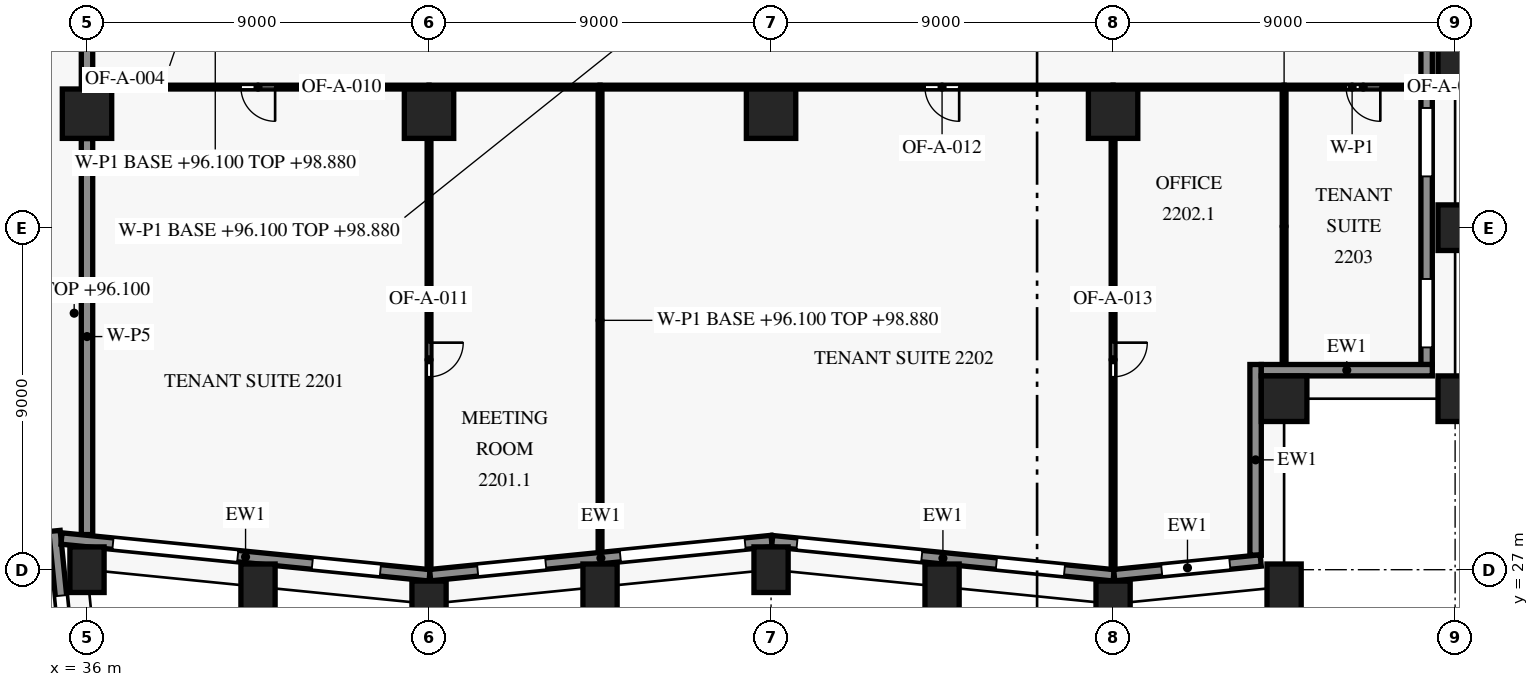
"""IFC4 building model, lengths in metres.
Left out: names, types, materials, properties, quantities, classifications, styles, units other than length and angle.
Written with IfcOpenShell. Run it as: python <this file> out.ifc"""

import sys

from ifc_helpers import new_model, si_unit, direction, frame, frame_2d, origin, origin_2d, place, context, subcontext, project, spatial, rectangle, extrude, element, fill, save


model = new_model("IFC4")
c1 = context("Model", 3, precision=1e-05, world=origin(), true_north=direction((0.0, 1.0)))
c2 = subcontext(c1, "Body", "Model", "MODEL_VIEW")
j1 = project(units=[si_unit("LENGTHUNIT", "METRE"), si_unit("PLANEANGLEUNIT", "RADIAN")], contexts=[c1])
p1 = place(None, origin())
s1 = spatial("IfcSite", under=j1, at=p1, CompositionType="ELEMENT")
p2 = place(p1, origin())
s2 = spatial("IfcBuilding", under=s1, at=p2, CompositionType="ELEMENT")
p3 = place(p2, frame((0.0, 0.0, 96.1)))
s3 = spatial("IfcBuildingStorey", under=s2, at=p3, CompositionType="ELEMENT", Elevation=96.1)
for number, where, z_axis, x_axis in (
    (1, (36.0, 27.0, 0.0), (0.0, 0.0, 1.0), (-0.1, 0.995, 0.0)),
    (2, (40.5, 26.55, 0.0), (0.0, 0.0, 1.0), (0.995, -0.1, 0.0)),
    (3, (45.0, 26.1, 0.0), (0.0, 0.0, 1.0), (1.0, 0.0, 0.0)),
    (4, (49.5, 26.55, 0.0), (0.0, 0.0, 1.0), (0.995, 0.1, 0.0)),
    (5, (54.0, 27.0, 0.0), (0.0, 0.0, 1.0), (1.0, 0.0, 0.0)),
    (6, (58.5, 26.55, 0.0), (0.0, 0.0, 1.0), (0.995, -0.1, 0.0)),
    (7, (63.0, 26.1, 0.0), (0.0, 0.0, 1.0), (1.0, 0.0, 0.0)),
    (8, (67.5, 26.55, 0.0), (0.0, 0.0, 1.0), (0.995, 0.1, 0.0)),
    (9, (72.0, 31.5, 0.0), (0.0, 0.0, 1.0), (0.0, 1.0, 0.0)),
    (10, (72.0, 36.0, 0.0), (0.0, 0.0, 1.0), (0.0, 1.0, 0.0)),
    (11, (72.0, 40.5, 0.0), (0.0, 0.0, 1.0), (0.0, 1.0, 0.0)),
):
    element("IfcColumn", number, at=place(p3, frame(where, z_axis=z_axis, x_axis=x_axis)), inside=s3, PredefinedType="COLUMN", context=c2, shape_type="SweptSolid", body=[
        extrude(rectangle(XDim=0.9, YDim=1.2, at=origin_2d()), origin(), (0.0, 0.0, 1.0), 3.8),
    ])
p4 = place(p3, frame((67.5, 31.5, 0.0), z_axis=(0.0, 0.0, 1.0), x_axis=(1.0, 0.0, 0.0)))
e12 = element("IfcColumn", 12, at=p4, inside=s3, PredefinedType="COLUMN", context=c2, shape_type="SweptSolid", body=[
    extrude(rectangle(XDim=1.2, YDim=1.2, at=origin_2d()), origin(), (0.0, 0.0, 1.0), 3.8),
])
for number, where, z_axis, x_axis in (
    (13, (36.0, 39.0, 0.0), (0.0, 0.0, 1.0), (1.0, 0.0, 0.0)),
    (14, (45.0, 39.0, 0.0), (0.0, 0.0, 1.0), (1.0, 0.0, 0.0)),
    (15, (54.0, 39.0, 0.0), (0.0, 0.0, 1.0), (1.0, 0.0, 0.0)),
    (16, (63.0, 39.0, 0.0), (0.0, 0.0, 1.0), (1.0, 0.0, 0.0)),
):
    element("IfcColumn", number, at=place(p3, frame(where, z_axis=z_axis, x_axis=x_axis)), inside=s3, PredefinedType="COLUMN", context=c2, shape_type="SweptSolid", body=[
        extrude(rectangle(XDim=1.3, YDim=1.3, at=origin_2d()), origin(), (0.0, 0.0, 1.0), 3.8),
    ])
p5 = place(p3, frame((35.144, 28.02, 0.0), z_axis=(0.0, 0.0, 1.0), x_axis=(0.099503719021, -0.99503719021, 0.0)))
e17 = element("IfcWall", 17, at=p5, inside=s3, PredefinedType="SOLIDWALL", context=c2, shape_type="SweptSolid", body=[
    extrude(rectangle(XDim=10.04, YDim=0.3, at=frame_2d((5.02, 0.0))), origin(), (0.0, 0.0, 1.0), 3.15),
])
p6 = place(p5, frame((1.711, 0.0, 0.15)))
e18 = element("IfcOpeningElement", 18, at=p6, cuts=e17, PredefinedType="OPENING", context=c2, shape_type="SweptSolid", body=[
    extrude(rectangle(XDim=3.3, YDim=2.4, at=frame_2d((1.65, 1.2))), frame((0.0, 0.16, 0.0), z_axis=(0.0, -1.0, 0.0), x_axis=(1.0, 0.0, 0.0)), (0.0, 0.0, 1.0), 0.32),
])
p7 = place(p5, frame((6.984, 0.0, 0.75)))
e19 = element("IfcOpeningElement", 19, at=p7, cuts=e17, PredefinedType="OPENING", context=c2, shape_type="SweptSolid", body=[
    extrude(rectangle(XDim=1.8, YDim=1.8, at=frame_2d((0.9, 0.9))), frame((0.0, 0.16, 0.0), z_axis=(0.0, -1.0, 0.0), x_axis=(1.0, 0.0, 0.0)), (0.0, 0.0, 1.0), 0.32),
])
p8 = place(p3, frame((45.015, 26.852, 0.0), z_axis=(0.0, 0.0, 1.0), x_axis=(-0.995037438546, 0.099501235631, 0.0)))
e20 = element("IfcWall", 20, at=p8, inside=s3, PredefinedType="SOLIDWALL", context=c2, shape_type="SweptSolid", body=[
    extrude(rectangle(XDim=9.734, YDim=0.3, at=frame_2d((4.867, 0.0))), origin(), (0.0, 0.0, 1.0), 3.15),
])
p9 = place(p8, frame((1.301, 0.0, 0.75)))
e21 = element("IfcOpeningElement", 21, at=p9, cuts=e20, PredefinedType="OPENING", context=c2, shape_type="SweptSolid", body=[
    extrude(rectangle(XDim=1.8, YDim=1.8, at=frame_2d((0.9, 0.9))), frame((0.0, 0.16, 0.0), z_axis=(0.0, -1.0, 0.0), x_axis=(1.0, 0.0, 0.0)), (0.0, 0.0, 1.0), 0.32),
])
p10 = place(p8, frame((5.073, 0.0, 0.15)))
e22 = element("IfcOpeningElement", 22, at=p10, cuts=e20, PredefinedType="OPENING", context=c2, shape_type="SweptSolid", body=[
    extrude(rectangle(XDim=3.3, YDim=2.4, at=frame_2d((1.65, 1.2))), frame((0.0, 0.16, 0.0), z_axis=(0.0, -1.0, 0.0), x_axis=(1.0, 0.0, 0.0)), (0.0, 0.0, 1.0), 0.32),
])
p11 = place(p3, frame((54.015, 27.755, 0.0), z_axis=(0.0, 0.0, 1.0), x_axis=(-0.995037993253, -0.099495688264, 0.0)))
e23 = element("IfcWall", 23, at=p11, inside=s3, PredefinedType="SOLIDWALL", context=c2, shape_type="SweptSolid", body=[
    extrude(rectangle(XDim=9.03, YDim=0.3, at=frame_2d((4.515, 0.0))), origin(), (0.0, 0.0, 1.0), 3.15),
])
p12 = place(p11, frame((0.701, 0.0, 0.15)))
e24 = element("IfcOpeningElement", 24, at=p12, cuts=e23, PredefinedType="OPENING", context=c2, shape_type="SweptSolid", body=[
    extrude(rectangle(XDim=3.3, YDim=2.4, at=frame_2d((1.65, 1.2))), frame((0.0, 0.16, 0.0), z_axis=(0.0, -1.0, 0.0), x_axis=(1.0, 0.0, 0.0)), (0.0, 0.0, 1.0), 0.32),
])
p13 = place(p11, frame((5.974, 0.0, 0.75)))
e25 = element("IfcOpeningElement", 25, at=p13, cuts=e23, PredefinedType="OPENING", context=c2, shape_type="SweptSolid", body=[
    extrude(rectangle(XDim=1.8, YDim=1.8, at=frame_2d((0.9, 0.9))), frame((0.0, 0.16, 0.0), z_axis=(0.0, -1.0, 0.0), x_axis=(1.0, 0.0, 0.0)), (0.0, 0.0, 1.0), 0.32),
])
p14 = place(p3, frame((63.015, 26.852, 0.0), z_axis=(0.0, 0.0, 1.0), x_axis=(-0.995037993253, 0.099495688264, 0.0)))
e26 = element("IfcWall", 26, at=p14, inside=s3, PredefinedType="SOLIDWALL", context=c2, shape_type="SweptSolid", body=[
    extrude(rectangle(XDim=9.03, YDim=0.3, at=frame_2d((4.515, 0.0))), origin(), (0.0, 0.0, 1.0), 3.15),
])
p15 = place(p14, frame((1.301, 0.0, 0.75)))
e27 = element("IfcOpeningElement", 27, at=p15, cuts=e26, PredefinedType="OPENING", context=c2, shape_type="SweptSolid", body=[
    extrude(rectangle(XDim=1.8, YDim=1.8, at=frame_2d((0.9, 0.9))), frame((0.0, 0.16, 0.0), z_axis=(0.0, -1.0, 0.0), x_axis=(1.0, 0.0, 0.0)), (0.0, 0.0, 1.0), 0.32),
])
p16 = place(p14, frame((5.073, 0.0, 0.15)))
e28 = element("IfcOpeningElement", 28, at=p16, cuts=e26, PredefinedType="OPENING", context=c2, shape_type="SweptSolid", body=[
    extrude(rectangle(XDim=3.3, YDim=2.4, at=frame_2d((1.65, 1.2))), frame((0.0, 0.16, 0.0), z_axis=(0.0, -1.0, 0.0), x_axis=(1.0, 0.0, 0.0)), (0.0, 0.0, 1.0), 0.32),
])
p17 = place(p3, frame((66.885, 27.242, 0.0), z_axis=(0.0, 0.0, 1.0), x_axis=(-0.995037814081, -0.099497480111, 0.0)))
e29 = element("IfcWall", 29, at=p17, inside=s3, PredefinedType="SOLIDWALL", context=c2, shape_type="SweptSolid", body=[
    extrude(rectangle(XDim=3.875, YDim=0.3, at=frame_2d((1.937, 0.0))), origin(), (0.0, 0.0, 1.0), 3.15),
])
p18 = place(p17, frame((0.818, 0.0, 0.75)))
e30 = element("IfcOpeningElement", 30, at=p18, cuts=e29, PredefinedType="OPENING", context=c2, shape_type="SweptSolid", body=[
    extrude(rectangle(XDim=1.8, YDim=1.8, at=frame_2d((0.9, 0.9))), frame((0.0, 0.16, 0.0), z_axis=(0.0, -1.0, 0.0), x_axis=(1.0, 0.0, 0.0)), (0.0, 0.0, 1.0), 0.32),
])
p19 = place(p3, frame((66.75, 32.4, 0.0), z_axis=(0.0, 0.0, 1.0), x_axis=(0.0, -1.0, 0.0)))
e31 = element("IfcWall", 31, at=p19, inside=s3, PredefinedType="SOLIDWALL", context=c2, shape_type="SweptSolid", body=[
    extrude(rectangle(XDim=5.019, YDim=0.3, at=frame_2d((2.51, 0.0))), origin(), (0.0, 0.0, 1.0), 3.15),
])
p20 = place(p3, frame((71.4, 32.25, 0.0), z_axis=(0.0, 0.0, 1.0), x_axis=(-1.0, 0.0, 0.0)))
e32 = element("IfcWall", 32, at=p20, inside=s3, PredefinedType="SOLIDWALL", context=c2, shape_type="SweptSolid", body=[
    extrude(rectangle(XDim=4.5, YDim=0.3, at=frame_2d((2.25, 0.0))), origin(), (0.0, 0.0, 1.0), 3.15),
])
p21 = place(p3, frame((71.25, 57.9, 0.0), z_axis=(0.0, 0.0, 1.0), x_axis=(0.0, -1.0, 0.0)))
e33 = element("IfcWall", 33, at=p21, inside=s3, PredefinedType="SOLIDWALL", context=c2, shape_type="SweptSolid", body=[
    extrude(rectangle(XDim=25.502, YDim=0.3, at=frame_2d((12.751, 0.0))), origin(), (0.0, 0.0, 1.0), 3.15),
])
p22 = place(p21, frame((0.75, 0.0, 0.75)))
e34 = element("IfcOpeningElement", 34, at=p22, cuts=e33, PredefinedType="OPENING", context=c2, shape_type="SweptSolid", body=[
    extrude(rectangle(XDim=1.8, YDim=1.8, at=frame_2d((0.9, 0.9))), frame((0.0, 0.16, 0.0), z_axis=(0.0, -1.0, 0.0), x_axis=(1.0, 0.0, 0.0)), (0.0, 0.0, 1.0), 0.32),
])
p23 = place(p21, frame((5.25, 0.0, 0.75)))
e35 = element("IfcOpeningElement", 35, at=p23, cuts=e33, PredefinedType="OPENING", context=c2, shape_type="SweptSolid", body=[
    extrude(rectangle(XDim=1.8, YDim=1.8, at=frame_2d((0.9, 0.9))), frame((0.0, 0.16, 0.0), z_axis=(0.0, -1.0, 0.0), x_axis=(1.0, 0.0, 0.0)), (0.0, 0.0, 1.0), 0.32),
])
p24 = place(p21, frame((9.0, 0.0, 0.15)))
e36 = element("IfcOpeningElement", 36, at=p24, cuts=e33, PredefinedType="OPENING", context=c2, shape_type="SweptSolid", body=[
    extrude(rectangle(XDim=3.3, YDim=2.4, at=frame_2d((1.65, 1.2))), frame((0.0, 0.16, 0.0), z_axis=(0.0, -1.0, 0.0), x_axis=(1.0, 0.0, 0.0)), (0.0, 0.0, 1.0), 0.32),
])
p25 = place(p21, frame((13.5, 0.0, 0.15)))
e37 = element("IfcOpeningElement", 37, at=p25, cuts=e33, PredefinedType="OPENING", context=c2, shape_type="SweptSolid", body=[
    extrude(rectangle(XDim=3.3, YDim=2.4, at=frame_2d((1.65, 1.2))), frame((0.0, 0.16, 0.0), z_axis=(0.0, -1.0, 0.0), x_axis=(1.0, 0.0, 0.0)), (0.0, 0.0, 1.0), 0.32),
])
p26 = place(p21, frame((18.75, 0.0, 0.75)))
e38 = element("IfcOpeningElement", 38, at=p26, cuts=e33, PredefinedType="OPENING", context=c2, shape_type="SweptSolid", body=[
    extrude(rectangle(XDim=1.8, YDim=1.8, at=frame_2d((0.9, 0.9))), frame((0.0, 0.16, 0.0), z_axis=(0.0, -1.0, 0.0), x_axis=(1.0, 0.0, 0.0)), (0.0, 0.0, 1.0), 0.32),
])
p27 = place(p21, frame((23.25, 0.0, 0.75)))
e39 = element("IfcOpeningElement", 39, at=p27, cuts=e33, PredefinedType="OPENING", context=c2, shape_type="SweptSolid", body=[
    extrude(rectangle(XDim=1.8, YDim=1.8, at=frame_2d((0.9, 0.9))), frame((0.0, 0.16, 0.0), z_axis=(0.0, -1.0, 0.0), x_axis=(1.0, 0.0, 0.0)), (0.0, 0.0, 1.0), 0.32),
])
for number, where, z_axis, x_axis in (
    (40, (24.655, 27.0, 0.0), (0.0, 0.0, 1.0), (1.0, 0.0, 0.0)),
    (41, (36.0, 27.925, 0.0), (0.0, 0.0, 1.0), (0.0, 1.0, 0.0)),
):
    element("IfcWall", number, at=place(p3, frame(where, z_axis=z_axis, x_axis=x_axis)), inside=s3, PredefinedType="PARTITIONING", context=c2, shape_type="SweptSolid", body=[
        extrude(rectangle(XDim=10.42, YDim=0.3, at=frame_2d((5.21, 0.0))), origin(), (0.0, 0.0, 1.0), 2.78),
    ])
p28 = place(p3, frame((45.0, 38.345, 0.0), z_axis=(0.0, 0.0, 1.0), x_axis=(0.0, -1.0, 0.0)))
e42 = element("IfcWall", 42, at=p28, inside=s3, PredefinedType="PARTITIONING", context=c2, shape_type="SweptSolid", body=[
    extrude(rectangle(XDim=11.321, YDim=0.1, at=frame_2d((5.66, 0.0))), origin(), (0.0, 0.0, 1.0), 2.88),
])
p29 = place(p28, frame((5.37, 0.0, 0.0)))
e43 = element("IfcOpeningElement", 43, at=p29, cuts=e42, PredefinedType="OPENING", context=c2, shape_type="SweptSolid", body=[
    extrude(rectangle(XDim=0.9, YDim=2.1, at=frame_2d((0.45, 1.05))), frame((0.0, 0.06, 0.0), z_axis=(0.0, -1.0, 0.0), x_axis=(1.0, 0.0, 0.0)), (0.0, 0.0, 1.0), 0.12),
])
p30 = place(p3, frame((63.0, 38.345, 0.0), z_axis=(0.0, 0.0, 1.0), x_axis=(0.0, -1.0, 0.0)))
e44 = element("IfcWall", 44, at=p30, inside=s3, PredefinedType="PARTITIONING", context=c2, shape_type="SweptSolid", body=[
    extrude(rectangle(XDim=11.321, YDim=0.1, at=frame_2d((5.66, 0.0))), origin(), (0.0, 0.0, 1.0), 2.88),
])
p31 = place(p30, frame((5.37, 0.0, 0.0)))
e45 = element("IfcOpeningElement", 45, at=p31, cuts=e44, PredefinedType="OPENING", context=c2, shape_type="SweptSolid", body=[
    extrude(rectangle(XDim=0.9, YDim=2.1, at=frame_2d((0.45, 1.05))), frame((0.0, 0.06, 0.0), z_axis=(0.0, -1.0, 0.0), x_axis=(1.0, 0.0, 0.0)), (0.0, 0.0, 1.0), 0.12),
])
p32 = place(p3, frame((49.5, 39.65, 0.0), z_axis=(0.0, 0.0, 1.0), x_axis=(0.0, -1.0, 0.0)))
e46 = element("IfcWall", 46, at=p32, inside=s3, PredefinedType="PARTITIONING", context=c2, shape_type="SweptSolid", body=[
    extrude(rectangle(XDim=12.175, YDim=0.1, at=frame_2d((6.088, 0.0))), origin(), (0.0, 0.0, 1.0), 2.78),
])
p33 = place(p3, frame((67.5, 39.65, 0.0), z_axis=(0.0, 0.0, 1.0), x_axis=(0.0, -1.0, 0.0)))
e47 = element("IfcWall", 47, at=p33, inside=s3, PredefinedType="PARTITIONING", context=c2, shape_type="SweptSolid", body=[
    extrude(rectangle(XDim=7.23, YDim=0.1, at=frame_2d((3.615, 0.0))), origin(), (0.0, 0.0, 1.0), 2.78),
])
p34 = place(p3, frame((45.0, 39.7, 0.0), z_axis=(0.0, 0.0, 1.0), x_axis=(-1.0, 0.0, 0.0)))
e48 = element("IfcWall", 48, at=p34, inside=s3, PredefinedType="PARTITIONING", context=c2, shape_type="SweptSolid", body=[
    extrude(rectangle(XDim=8.95, YDim=0.1, at=frame_2d((4.475, 0.0))), origin(), (0.0, 0.0, 1.0), 2.78),
])
p35 = place(p34, frame((4.05, 0.0, 0.0)))
e49 = element("IfcOpeningElement", 49, at=p35, cuts=e48, PredefinedType="OPENING", context=c2, shape_type="SweptSolid", body=[
    extrude(rectangle(XDim=0.9, YDim=2.1, at=frame_2d((0.45, 1.05))), frame((0.0, 0.06, 0.0), z_axis=(0.0, -1.0, 0.0), x_axis=(1.0, 0.0, 0.0)), (0.0, 0.0, 1.0), 0.12),
])
p36 = place(p3, frame((49.5, 39.7, 0.0), z_axis=(0.0, 0.0, 1.0), x_axis=(-1.0, 0.0, 0.0)))
e50 = element("IfcWall", 50, at=p36, inside=s3, PredefinedType="PARTITIONING", context=c2, shape_type="SweptSolid", body=[
    extrude(rectangle(XDim=4.5, YDim=0.1, at=frame_2d((2.25, 0.0))), origin(), (0.0, 0.0, 1.0), 2.88),
])
p37 = place(p3, frame((63.0, 39.7, 0.0), z_axis=(0.0, 0.0, 1.0), x_axis=(-1.0, 0.0, 0.0)))
e51 = element("IfcWall", 51, at=p37, inside=s3, PredefinedType="PARTITIONING", context=c2, shape_type="SweptSolid", body=[
    extrude(rectangle(XDim=13.5, YDim=0.1, at=frame_2d((6.75, 0.0))), origin(), (0.0, 0.0, 1.0), 2.88),
])
p38 = place(p37, frame((4.05, 0.0, 0.0)))
e52 = element("IfcOpeningElement", 52, at=p38, cuts=e51, PredefinedType="OPENING", context=c2, shape_type="SweptSolid", body=[
    extrude(rectangle(XDim=0.9, YDim=2.1, at=frame_2d((0.45, 1.05))), frame((0.0, 0.06, 0.0), z_axis=(0.0, -1.0, 0.0), x_axis=(1.0, 0.0, 0.0)), (0.0, 0.0, 1.0), 0.12),
])
p39 = place(p3, frame((67.5, 39.7, 0.0), z_axis=(0.0, 0.0, 1.0), x_axis=(-1.0, 0.0, 0.0)))
e53 = element("IfcWall", 53, at=p39, inside=s3, PredefinedType="PARTITIONING", context=c2, shape_type="SweptSolid", body=[
    extrude(rectangle(XDim=4.5, YDim=0.1, at=frame_2d((2.25, 0.0))), origin(), (0.0, 0.0, 1.0), 2.88),
])
p40 = place(p3, frame((71.08, 39.7, 0.0), z_axis=(0.0, 0.0, 1.0), x_axis=(-1.0, 0.0, 0.0)))
e54 = element("IfcWall", 54, at=p40, inside=s3, PredefinedType="PARTITIONING", context=c2, shape_type="SweptSolid", body=[
    extrude(rectangle(XDim=3.58, YDim=0.1, at=frame_2d((1.79, 0.0))), origin(), (0.0, 0.0, 1.0), 3.48),
])
p41 = place(p40, frame((1.048, 0.0, 0.0)))
e55 = element("IfcOpeningElement", 55, at=p41, cuts=e54, PredefinedType="OPENING", context=c2, shape_type="SweptSolid", body=[
    extrude(rectangle(XDim=0.9, YDim=2.1, at=frame_2d((0.45, 1.05))), frame((0.0, 0.06, 0.0), z_axis=(0.0, -1.0, 0.0), x_axis=(1.0, 0.0, 0.0)), (0.0, 0.0, 1.0), 0.12),
])
p42 = place(p3, frame((36.0, 39.67, 0.0), z_axis=(0.0, 0.0, 1.0), x_axis=(0.0, 1.0, 0.0)))
e56 = element("IfcWall", 56, at=p42, inside=s3, PredefinedType="PARTITIONING", context=c2, shape_type="SweptSolid", body=[
    extrude(rectangle(XDim=3.18, YDim=0.3, at=frame_2d((1.59, 0.0))), origin(), (0.0, 0.0, 1.0), 2.78),
])
p43 = place(p6, origin())
e57 = element("IfcWindow", 57, at=p43, inside=s3, PartitioningType="SINGLE_PANEL", PredefinedType="WINDOW", context=c2, shape_type="SweptSolid", body=[
    extrude(rectangle(XDim=3.3, YDim=2.4, at=frame_2d((1.65, 1.2))), frame((0.0, 0.03, 0.0), z_axis=(0.0, -1.0, 0.0), x_axis=(1.0, 0.0, 0.0)), (0.0, 0.0, 1.0), 0.06),
])
fill(e18, e57)
p44 = place(p9, origin())
e58 = element("IfcWindow", 58, at=p44, inside=s3, PartitioningType="SINGLE_PANEL", PredefinedType="WINDOW", context=c2, shape_type="SweptSolid", body=[
    extrude(rectangle(XDim=1.8, YDim=1.8, at=frame_2d((0.9, 0.9))), frame((0.0, 0.03, 0.0), z_axis=(0.0, -1.0, 0.0), x_axis=(1.0, 0.0, 0.0)), (0.0, 0.0, 1.0), 0.06),
])
fill(e21, e58)
p45 = place(p10, origin())
e59 = element("IfcWindow", 59, at=p45, inside=s3, PartitioningType="SINGLE_PANEL", PredefinedType="WINDOW", context=c2, shape_type="SweptSolid", body=[
    extrude(rectangle(XDim=3.3, YDim=2.4, at=frame_2d((1.65, 1.2))), frame((0.0, 0.03, 0.0), z_axis=(0.0, -1.0, 0.0), x_axis=(1.0, 0.0, 0.0)), (0.0, 0.0, 1.0), 0.06),
])
fill(e22, e59)
p46 = place(p12, origin())
e60 = element("IfcWindow", 60, at=p46, inside=s3, PartitioningType="SINGLE_PANEL", PredefinedType="WINDOW", context=c2, shape_type="SweptSolid", body=[
    extrude(rectangle(XDim=3.3, YDim=2.4, at=frame_2d((1.65, 1.2))), frame((0.0, 0.03, 0.0), z_axis=(0.0, -1.0, 0.0), x_axis=(1.0, 0.0, 0.0)), (0.0, 0.0, 1.0), 0.06),
])
fill(e24, e60)
p47 = place(p13, origin())
e61 = element("IfcWindow", 61, at=p47, inside=s3, PartitioningType="SINGLE_PANEL", PredefinedType="WINDOW", context=c2, shape_type="SweptSolid", body=[
    extrude(rectangle(XDim=1.8, YDim=1.8, at=frame_2d((0.9, 0.9))), frame((0.0, 0.03, 0.0), z_axis=(0.0, -1.0, 0.0), x_axis=(1.0, 0.0, 0.0)), (0.0, 0.0, 1.0), 0.06),
])
fill(e25, e61)
p48 = place(p15, origin())
e62 = element("IfcWindow", 62, at=p48, inside=s3, PartitioningType="SINGLE_PANEL", PredefinedType="WINDOW", context=c2, shape_type="SweptSolid", body=[
    extrude(rectangle(XDim=1.8, YDim=1.8, at=frame_2d((0.9, 0.9))), frame((0.0, 0.03, 0.0), z_axis=(0.0, -1.0, 0.0), x_axis=(1.0, 0.0, 0.0)), (0.0, 0.0, 1.0), 0.06),
])
fill(e27, e62)
p49 = place(p16, origin())
e63 = element("IfcWindow", 63, at=p49, inside=s3, PartitioningType="SINGLE_PANEL", PredefinedType="WINDOW", context=c2, shape_type="SweptSolid", body=[
    extrude(rectangle(XDim=3.3, YDim=2.4, at=frame_2d((1.65, 1.2))), frame((0.0, 0.03, 0.0), z_axis=(0.0, -1.0, 0.0), x_axis=(1.0, 0.0, 0.0)), (0.0, 0.0, 1.0), 0.06),
])
fill(e28, e63)
p50 = place(p18, origin())
e64 = element("IfcWindow", 64, at=p50, inside=s3, PartitioningType="SINGLE_PANEL", PredefinedType="WINDOW", context=c2, shape_type="SweptSolid", body=[
    extrude(rectangle(XDim=1.8, YDim=1.8, at=frame_2d((0.9, 0.9))), frame((0.0, 0.03, 0.0), z_axis=(0.0, -1.0, 0.0), x_axis=(1.0, 0.0, 0.0)), (0.0, 0.0, 1.0), 0.06),
])
fill(e30, e64)
p51 = place(p26, origin())
e65 = element("IfcWindow", 65, at=p51, inside=s3, PartitioningType="SINGLE_PANEL", PredefinedType="WINDOW", context=c2, shape_type="SweptSolid", body=[
    extrude(rectangle(XDim=1.8, YDim=1.8, at=frame_2d((0.9, 0.9))), frame((0.0, 0.03, 0.0), z_axis=(0.0, -1.0, 0.0), x_axis=(1.0, 0.0, 0.0)), (0.0, 0.0, 1.0), 0.06),
])
fill(e38, e65)
p52 = place(p27, origin())
e66 = element("IfcWindow", 66, at=p52, inside=s3, PartitioningType="SINGLE_PANEL", PredefinedType="WINDOW", context=c2, shape_type="SweptSolid", body=[
    extrude(rectangle(XDim=1.8, YDim=1.8, at=frame_2d((0.9, 0.9))), frame((0.0, 0.03, 0.0), z_axis=(0.0, -1.0, 0.0), x_axis=(1.0, 0.0, 0.0)), (0.0, 0.0, 1.0), 0.06),
])
fill(e39, e66)
p53 = place(p35, origin())
e67 = element("IfcDoor", 67, at=p53, inside=s3, OperationType="SINGLE_SWING_LEFT", PredefinedType="DOOR", context=c2, shape_type="SweptSolid", body=[
    extrude(rectangle(XDim=0.9, YDim=2.1, at=frame_2d((0.45, 1.05))), frame((0.0, 0.025, 0.0), z_axis=(0.0, -1.0, 0.0), x_axis=(1.0, 0.0, 0.0)), (0.0, 0.0, 1.0), 0.05),
])
fill(e49, e67)
p54 = place(p29, origin())
e68 = element("IfcDoor", 68, at=p54, inside=s3, OperationType="SINGLE_SWING_LEFT", PredefinedType="DOOR", context=c2, shape_type="SweptSolid", body=[
    extrude(rectangle(XDim=0.9, YDim=2.1, at=frame_2d((0.45, 1.05))), frame((0.0, 0.025, 0.0), z_axis=(0.0, -1.0, 0.0), x_axis=(1.0, 0.0, 0.0)), (0.0, 0.0, 1.0), 0.05),
])
fill(e43, e68)
p55 = place(p38, origin())
e69 = element("IfcDoor", 69, at=p55, inside=s3, OperationType="SINGLE_SWING_LEFT", PredefinedType="DOOR", context=c2, shape_type="SweptSolid", body=[
    extrude(rectangle(XDim=0.9, YDim=2.1, at=frame_2d((0.45, 1.05))), frame((0.0, 0.025, 0.0), z_axis=(0.0, -1.0, 0.0), x_axis=(1.0, 0.0, 0.0)), (0.0, 0.0, 1.0), 0.05),
])
fill(e52, e69)
p56 = place(p31, origin())
e70 = element("IfcDoor", 70, at=p56, inside=s3, OperationType="SINGLE_SWING_LEFT", PredefinedType="DOOR", context=c2, shape_type="SweptSolid", body=[
    extrude(rectangle(XDim=0.9, YDim=2.1, at=frame_2d((0.45, 1.05))), frame((0.0, 0.025, 0.0), z_axis=(0.0, -1.0, 0.0), x_axis=(1.0, 0.0, 0.0)), (0.0, 0.0, 1.0), 0.05),
])
fill(e45, e70)
p57 = place(p41, origin())
e71 = element("IfcDoor", 71, at=p57, inside=s3, OperationType="SINGLE_SWING_LEFT", PredefinedType="DOOR", context=c2, shape_type="SweptSolid", body=[
    extrude(rectangle(XDim=0.9, YDim=2.1, at=frame_2d((0.45, 1.05))), frame((0.0, 0.025, 0.0), z_axis=(0.0, -1.0, 0.0), x_axis=(1.0, 0.0, 0.0)), (0.0, 0.0, 1.0), 0.05),
])
fill(e55, e71)
save(model, sys.argv[1])
